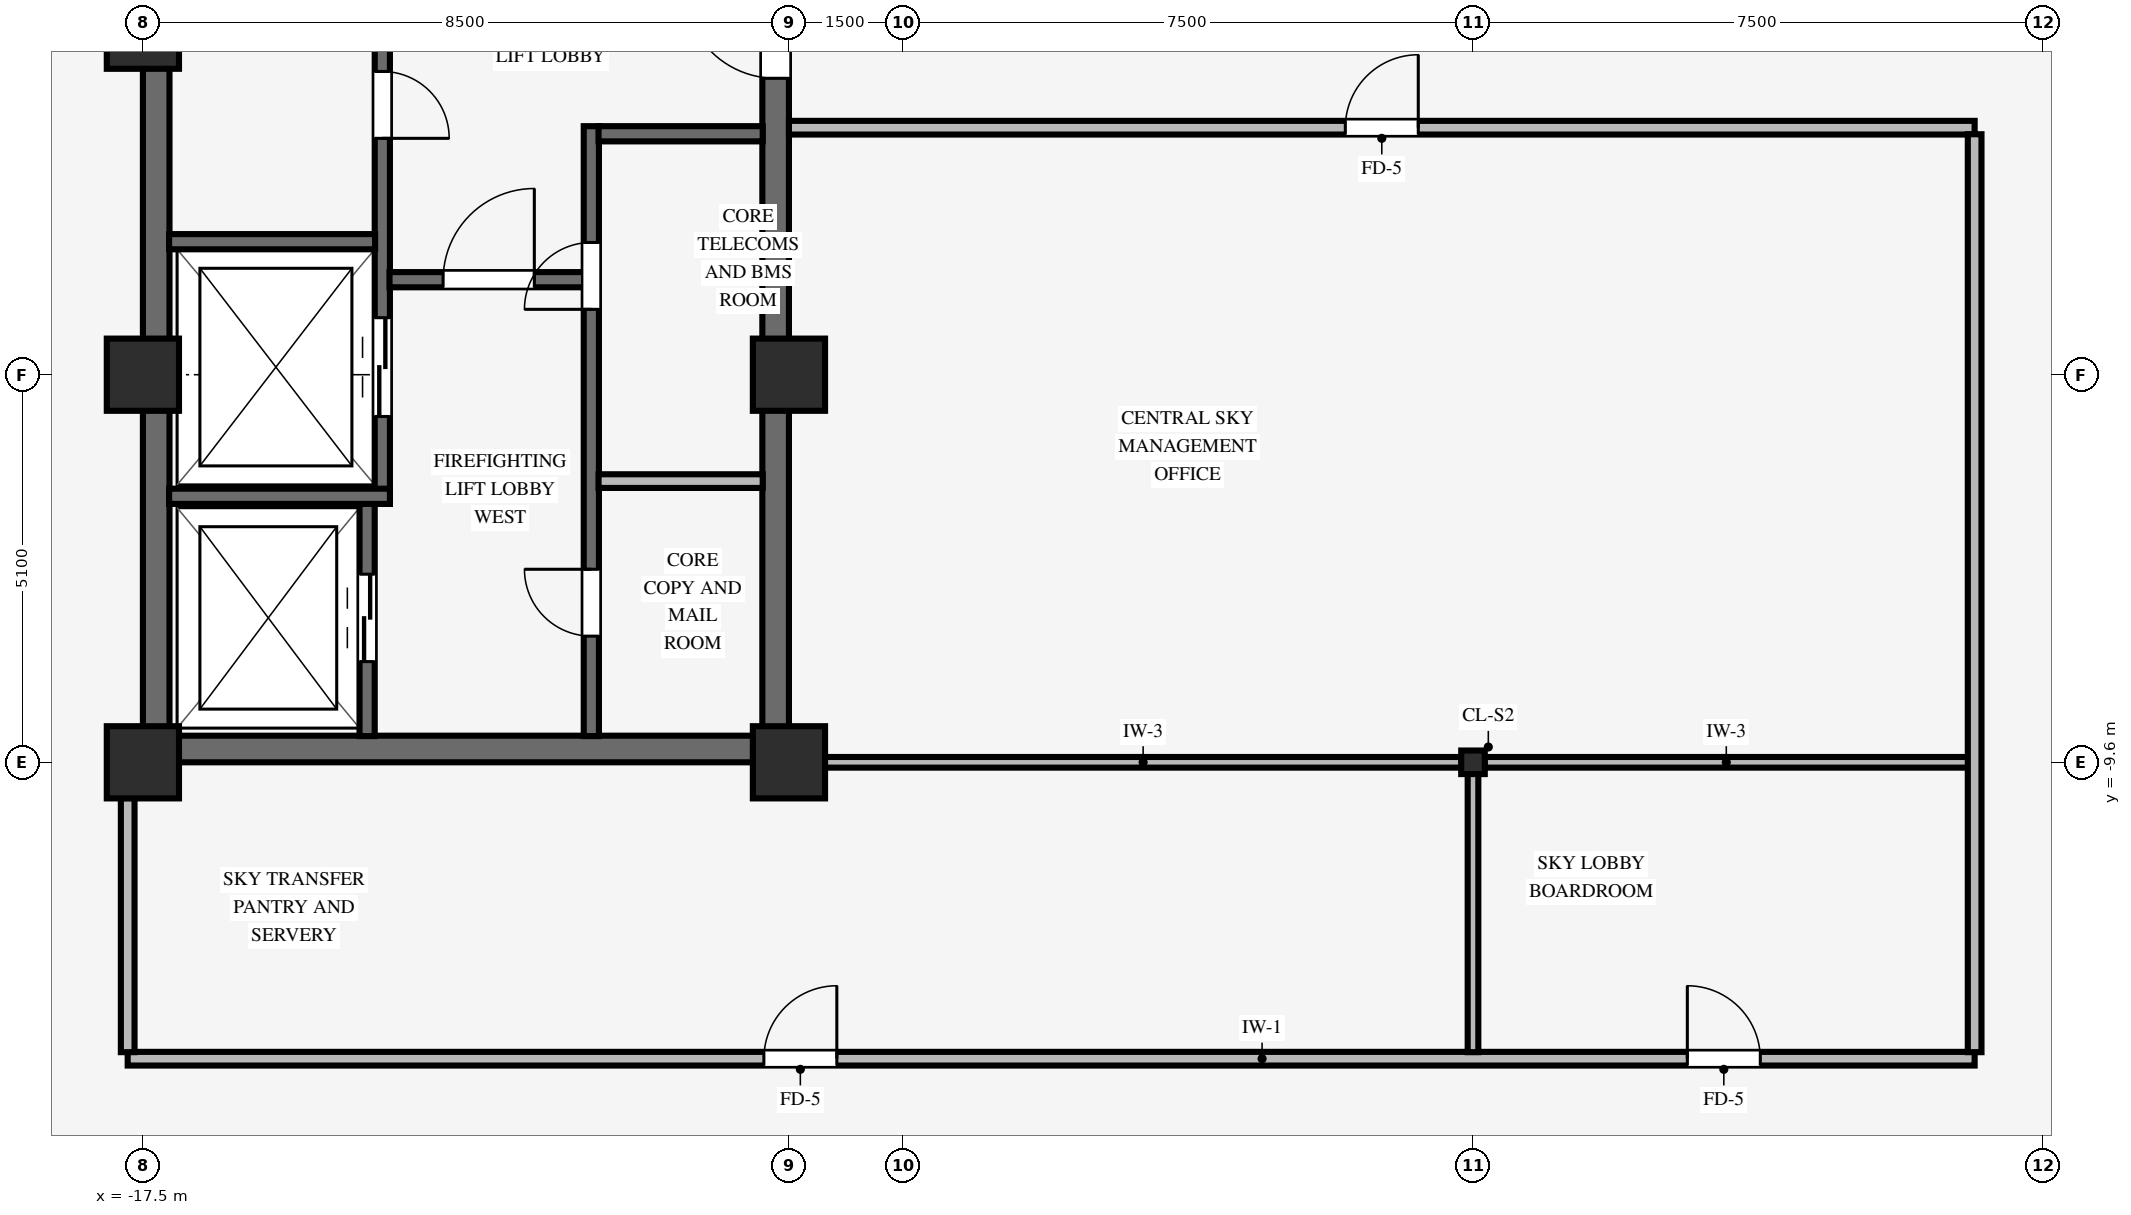
"""IFC4 building model, lengths in metres.
Left out: names, types, materials, properties, quantities, classifications, styles, units other than length and angle.
Written with IfcOpenShell. Run it as: python <this file> out.ifc"""

import sys

from ifc_helpers import new_model, si_unit, direction, frame, frame_2d, origin, origin_2d, place, context, subcontext, project, spatial, rectangle, i_section, extrude, source, transform, mapped, element, fill, save


model = new_model("IFC4")
c1 = context("Model", 3, precision=1e-05, world=origin(), true_north=direction((0.0, 1.0)))
c2 = subcontext(c1, "Body", "Model", "MODEL_VIEW")
j1 = project(units=[si_unit("LENGTHUNIT", "METRE"), si_unit("PLANEANGLEUNIT", "RADIAN")], contexts=[c1])
p1 = place(None, origin())
s1 = spatial("IfcSite", under=j1, at=p1, CompositionType="ELEMENT")
p2 = place(p1, origin())
s2 = spatial("IfcBuilding", under=s1, at=p2, CompositionType="ELEMENT")
p3 = place(p2, frame((0.0, 0.0, 223.75)))
s3 = spatial("IfcBuildingStorey", under=s2, at=p3, CompositionType="ELEMENT", Elevation=223.75)
p4 = place(p3, frame((-17.5, -9.425, 0.0), z_axis=(0.0, 0.0, 1.0), x_axis=(1.0, 0.0, 0.0)))
e1 = element("IfcWall", 1, at=p4, inside=s3, PredefinedType="SHEAR", context=c2, shape_type="SweptSolid", body=[
    extrude(rectangle(XDim=8.5, YDim=0.35, at=frame_2d((4.25, 0.0))), origin(), (0.0, 0.0, 1.0), 3.37),
])
p5 = place(p3, frame((-17.325, -9.255, 0.0), z_axis=(0.0, 0.0, 1.0), x_axis=(0.0, 1.0, 0.0)))
e2 = element("IfcWall", 2, at=p5, inside=s3, PredefinedType="SHEAR", context=c2, shape_type="SweptSolid", body=[
    extrude(rectangle(XDim=18.51, YDim=0.35, at=frame_2d((9.255, 0.0))), origin(), (0.0, 0.0, 1.0), 3.37),
])
p6 = place(p3, frame((-9.175, -9.255, 0.0), z_axis=(0.0, 0.0, 1.0), x_axis=(0.0, 1.0, 0.0)))
e3 = element("IfcWall", 3, at=p6, inside=s3, PredefinedType="SHEAR", context=c2, shape_type="SweptSolid", body=[
    extrude(rectangle(XDim=18.51, YDim=0.35, at=frame_2d((9.255, 0.0))), origin(), (0.0, 0.0, 1.0), 3.37),
])
p7 = place(p6, frame((8.655, 0.0, 0.0)))
e4 = element("IfcOpeningElement", 4, at=p7, cuts=e3, PredefinedType="OPENING", context=c2, shape_type="SweptSolid", body=[
    extrude(rectangle(XDim=1.2, YDim=2.15, at=frame_2d((0.6, 1.075))), frame((0.0, 0.185, 0.0), z_axis=(0.0, -1.0, 0.0), x_axis=(1.0, 0.0, 0.0)), (0.0, 0.0, 1.0), 0.37),
])
for number, where, z_axis, x_axis in (
    (5, (-17.5, -9.6, 0.0), (0.0, 0.0, 1.0), (1.0, 0.0, 0.0)),
    (6, (-17.5, -4.5, 0.0), (0.0, 0.0, 1.0), (1.0, 0.0, 0.0)),
    (7, (-9.0, -9.6, 0.0), (0.0, 0.0, 1.0), (1.0, 0.0, 0.0)),
    (8, (-9.0, -4.5, 0.0), (0.0, 0.0, 1.0), (1.0, 0.0, 0.0)),
    (9, (-17.5, 0.0, 0.0), (0.0, 0.0, 1.0), (1.0, 0.0, 0.0)),
):
    element("IfcColumn", number, at=place(p3, frame(where, z_axis=z_axis, x_axis=x_axis)), inside=s3, PredefinedType="COLUMN", context=c2, shape_type="SweptSolid", body=[
        extrude(rectangle(XDim=0.95, YDim=0.95, at=origin_2d()), origin(), (0.0, 0.0, 1.0), 3.37),
    ])
p8 = place(p3, frame((0.0, -9.6, 0.0), z_axis=(0.0, 0.0, 1.0), x_axis=(1.0, 0.0, 0.0)))
e10 = element("IfcColumn", 10, at=p8, inside=s3, PredefinedType="COLUMN", context=c2, shape_type="SweptSolid", body=[
    extrude(i_section(OverallWidth=0.31, OverallDepth=0.31, WebThickness=0.015, FlangeThickness=0.015, FilletRadius=0.015, at=origin_2d()), origin(), (0.0, 0.0, 1.0), 3.37),
])
p9 = place(p3, frame((-14.55, -9.255, 0.0), z_axis=(0.0, 0.0, 1.0), x_axis=(0.0, 1.0, 0.0)))
e11 = element("IfcWall", 11, at=p9, inside=s3, PredefinedType="SHEAR", context=c2, shape_type="SweptSolid", body=[
    extrude(rectangle(XDim=3.06, YDim=0.2, at=frame_2d((1.53, 0.0))), origin(), (0.0, 0.0, 1.0), 3.37),
])
p10 = place(p9, frame((0.98, 0.0, 0.0)))
e12 = element("IfcOpeningElement", 12, at=p10, cuts=e11, PredefinedType="OPENING", context=c2, shape_type="SweptSolid", body=[
    extrude(rectangle(XDim=1.15, YDim=2.15, at=frame_2d((0.575, 1.075))), frame((0.0, 0.11, 0.0), z_axis=(0.0, -1.0, 0.0), x_axis=(1.0, 0.0, 0.0)), (0.0, 0.0, 1.0), 0.22),
])
p11 = place(p3, frame((-14.35, -6.2, 0.0), z_axis=(0.0, 0.0, 1.0), x_axis=(0.0, 1.0, 0.0)))
e13 = element("IfcWall", 13, at=p11, inside=s3, PredefinedType="SHEAR", context=c2, shape_type="SweptSolid", body=[
    extrude(rectangle(XDim=7.105, YDim=0.2, at=frame_2d((3.552, 0.0))), origin(), (0.0, 0.0, 1.0), 3.37),
])
p12 = place(p11, frame((5.69, 0.0, 0.0), z_axis=(0.0, 0.0, 1.0), x_axis=(-1.0, 0.0, 0.0)))
e14 = element("IfcOpeningElement", 14, at=p12, cuts=e13, PredefinedType="OPENING", context=c2, shape_type="SweptSolid", body=[
    extrude(rectangle(XDim=0.88, YDim=2.1, at=frame_2d((0.44, 1.05))), frame((0.0, 0.11, 0.0), z_axis=(0.0, -1.0, 0.0), x_axis=(1.0, 0.0, 0.0)), (0.0, 0.0, 1.0), 0.22),
])
p13 = place(p11, frame((1.15, 0.0, 0.0)))
e15 = element("IfcOpeningElement", 15, at=p13, cuts=e13, PredefinedType="OPENING", context=c2, shape_type="SweptSolid", body=[
    extrude(rectangle(XDim=1.3, YDim=2.2, at=frame_2d((0.65, 1.1))), frame((0.0, 0.11, 0.0), z_axis=(0.0, -1.0, 0.0), x_axis=(1.0, 0.0, 0.0)), (0.0, 0.0, 1.0), 0.22),
])
p14 = place(p3, frame((-17.155, -6.1, 0.0), z_axis=(0.0, 0.0, 1.0), x_axis=(1.0, 0.0, 0.0)))
e16 = element("IfcWall", 16, at=p14, inside=s3, PredefinedType="SHEAR", context=c2, shape_type="SweptSolid", body=[
    extrude(rectangle(XDim=2.905, YDim=0.2, at=frame_2d((1.453, 0.0))), origin(), (0.0, 0.0, 1.0), 3.37),
])
p15 = place(p3, frame((-17.155, -2.75, 0.0), z_axis=(0.0, 0.0, 1.0), x_axis=(1.0, 0.0, 0.0)))
e17 = element("IfcWall", 17, at=p15, inside=s3, PredefinedType="SHEAR", context=c2, shape_type="SweptSolid", body=[
    extrude(rectangle(XDim=2.71, YDim=0.2, at=frame_2d((1.355, 0.0))), origin(), (0.0, 0.0, 1.0), 3.37),
])
p16 = place(p3, frame((-11.6, -9.255, 0.0), z_axis=(0.0, 0.0, 1.0), x_axis=(0.0, 1.0, 0.0)))
e18 = element("IfcWall", 18, at=p16, inside=s3, PredefinedType="SHEAR", context=c2, shape_type="SweptSolid", body=[
    extrude(rectangle(XDim=8.025, YDim=0.2, at=frame_2d((4.012, 0.0))), origin(), (0.0, 0.0, 1.0), 3.37),
])
p17 = place(p16, frame((1.315, 0.0, 0.0)))
e19 = element("IfcOpeningElement", 19, at=p17, cuts=e18, PredefinedType="OPENING", context=c2, shape_type="SweptSolid", body=[
    extrude(rectangle(XDim=0.88, YDim=2.1, at=frame_2d((0.44, 1.05))), frame((0.0, 0.11, 0.0), z_axis=(0.0, -1.0, 0.0), x_axis=(1.0, 0.0, 0.0)), (0.0, 0.0, 1.0), 0.22),
])
p18 = place(p16, frame((5.615, 0.0, 0.0)))
e20 = element("IfcOpeningElement", 20, at=p18, cuts=e18, PredefinedType="OPENING", context=c2, shape_type="SweptSolid", body=[
    extrude(rectangle(XDim=0.88, YDim=2.1, at=frame_2d((0.44, 1.05))), frame((0.0, 0.11, 0.0), z_axis=(0.0, -1.0, 0.0), x_axis=(1.0, 0.0, 0.0)), (0.0, 0.0, 1.0), 0.22),
])
p19 = place(p3, frame((-14.255, -3.25, 0.0), z_axis=(0.0, 0.0, 1.0), x_axis=(1.0, 0.0, 0.0)))
e21 = element("IfcWall", 21, at=p19, inside=s3, PredefinedType="SHEAR", context=c2, shape_type="SweptSolid", body=[
    extrude(rectangle(XDim=2.56, YDim=0.2, at=frame_2d((1.28, 0.0))), origin(), (0.0, 0.0, 1.0), 3.37),
])
p20 = place(p19, frame((0.705, 0.0, 0.0)))
e22 = element("IfcOpeningElement", 22, at=p20, cuts=e21, PredefinedType="OPENING", context=c2, shape_type="SweptSolid", body=[
    extrude(rectangle(XDim=1.2, YDim=2.15, at=frame_2d((0.6, 1.075))), frame((0.0, 0.11, 0.0), z_axis=(0.0, -1.0, 0.0), x_axis=(1.0, 0.0, 0.0)), (0.0, 0.0, 1.0), 0.22),
])
p21 = place(p3, frame((-11.505, -1.33, 0.0), z_axis=(0.0, 0.0, 1.0), x_axis=(1.0, 0.0, 0.0)))
e23 = element("IfcWall", 23, at=p21, inside=s3, PredefinedType="SHEAR", context=c2, shape_type="SweptSolid", body=[
    extrude(rectangle(XDim=2.16, YDim=0.2, at=frame_2d((1.08, 0.0))), origin(), (0.0, 0.0, 1.0), 3.37),
])
p22 = place(p3, frame((-11.505, -5.9, 0.0), z_axis=(0.0, 0.0, 1.0), x_axis=(1.0, 0.0, 0.0)))
e24 = element("IfcWall", 24, at=p22, inside=s3, PredefinedType="PARTITIONING", context=c2, shape_type="SweptSolid", body=[
    extrude(rectangle(XDim=2.16, YDim=0.18, at=frame_2d((1.08, 0.0))), origin(), (0.0, 0.0, 1.0), 3.36),
])
p23 = place(p3, frame((-17.7, -13.5, 0.0), z_axis=(0.0, 0.0, 1.0), x_axis=(1.0, 0.0, 0.0)))
e25 = element("IfcWall", 25, at=p23, inside=s3, PredefinedType="PARTITIONING", context=c2, shape_type="SweptSolid", body=[
    extrude(rectangle(XDim=24.3, YDim=0.18, at=frame_2d((12.15, 0.0))), origin(), (0.0, 0.0, 1.0), 3.049),
])
p24 = place(p23, frame((8.37, 0.0, 0.0)))
e26 = element("IfcOpeningElement", 26, at=p24, cuts=e25, PredefinedType="OPENING", context=c2, shape_type="SweptSolid", body=[
    extrude(rectangle(XDim=0.96, YDim=2.1, at=frame_2d((0.48, 1.05))), frame((0.0, 0.1, 0.0), z_axis=(0.0, -1.0, 0.0), x_axis=(1.0, 0.0, 0.0)), (0.0, 0.0, 1.0), 0.2),
])
p25 = place(p23, frame((20.52, 0.0, 0.0)))
e27 = element("IfcOpeningElement", 27, at=p25, cuts=e25, PredefinedType="OPENING", context=c2, shape_type="SweptSolid", body=[
    extrude(rectangle(XDim=0.96, YDim=2.1, at=frame_2d((0.48, 1.05))), frame((0.0, 0.1, 0.0), z_axis=(0.0, -1.0, 0.0), x_axis=(1.0, 0.0, 0.0)), (0.0, 0.0, 1.0), 0.2),
])
p26 = place(p3, frame((-8.529, -9.6, 0.0), z_axis=(0.0, 0.0, 1.0), x_axis=(1.0, 0.0, 0.0)))
e28 = element("IfcWall", 28, at=p26, inside=s3, PredefinedType="PARTITIONING", context=c2, shape_type="SweptSolid", body=[
    extrude(rectangle(XDim=8.378, YDim=0.14, at=frame_2d((4.189, 0.0))), origin(), (0.0, 0.0, 1.0), 2.405),
])
p27 = place(p3, frame((0.151, -9.6, 0.0), z_axis=(0.0, 0.0, 1.0), x_axis=(1.0, 0.0, 0.0)))
e29 = element("IfcWall", 29, at=p27, inside=s3, PredefinedType="PARTITIONING", context=c2, shape_type="SweptSolid", body=[
    extrude(rectangle(XDim=6.363, YDim=0.14, at=frame_2d((3.182, 0.0))), origin(), (0.0, 0.0, 1.0), 2.405),
])
p28 = place(p3, frame((-9.0, -1.25, 0.0), z_axis=(0.0, 0.0, 1.0), x_axis=(1.0, 0.0, 0.0)))
e30 = element("IfcWall", 30, at=p28, inside=s3, PredefinedType="PARTITIONING", context=c2, shape_type="SweptSolid", body=[
    extrude(rectangle(XDim=15.6, YDim=0.18, at=frame_2d((7.8, 0.0))), origin(), (0.0, 0.0, 1.0), 3.36),
])
p29 = place(p28, frame((7.32, 0.0, 0.0)))
e31 = element("IfcOpeningElement", 31, at=p29, cuts=e30, PredefinedType="OPENING", context=c2, shape_type="SweptSolid", body=[
    extrude(rectangle(XDim=0.96, YDim=2.1, at=frame_2d((0.48, 1.05))), frame((0.0, 0.1, 0.0), z_axis=(0.0, -1.0, 0.0), x_axis=(1.0, 0.0, 0.0)), (0.0, 0.0, 1.0), 0.2),
])
p30 = place(p3, frame((-17.7, -13.414, 0.0), z_axis=(0.0, 0.0, 1.0), x_axis=(0.0, 1.0, 0.0)))
e32 = element("IfcWall", 32, at=p30, inside=s3, PredefinedType="PARTITIONING", context=c2, shape_type="SweptSolid", body=[
    extrude(rectangle(XDim=3.343, YDim=0.18, at=frame_2d((1.671, 0.0))), origin(), (0.0, 0.0, 1.0), 2.892),
])
p31 = place(p3, frame((0.0, -13.414, 0.0), z_axis=(0.0, 0.0, 1.0), x_axis=(0.0, 1.0, 0.0)))
e33 = element("IfcWall", 33, at=p31, inside=s3, PredefinedType="PARTITIONING", context=c2, shape_type="SweptSolid", body=[
    extrude(rectangle(XDim=3.663, YDim=0.14, at=frame_2d((1.832, 0.0))), origin(), (0.0, 0.0, 1.0), 2.892),
])
p32 = place(p3, frame((6.6, -13.414, 0.0), z_axis=(0.0, 0.0, 1.0), x_axis=(0.0, 1.0, 0.0)))
e34 = element("IfcWall", 34, at=p32, inside=s3, PredefinedType="PARTITIONING", context=c2, shape_type="SweptSolid", body=[
    extrude(rectangle(XDim=12.078, YDim=0.18, at=frame_2d((6.039, 0.0))), origin(), (0.0, 0.0, 1.0), 3.36),
])
m1 = source(origin(), c2, "Body", "SweptSolid", [
    extrude(rectangle(XDim=0.88, YDim=2.1, at=frame_2d((0.44, 1.05))), frame((0.0, 0.025, 0.0), z_axis=(0.0, -1.0, 0.0), x_axis=(1.0, 0.0, 0.0)), (0.0, 0.0, 1.0), 0.05),
])
p33 = place(p12, origin())
e35 = element("IfcDoor", 35, at=p33, inside=s3, OperationType="SINGLE_SWING_RIGHT", PredefinedType="DOOR", context=c2, shape_type="MappedRepresentation", body=[
    mapped(m1, transform((0.0, 0.0, 0.0), scale=1.0)),
])
fill(e14, e35)
m2 = source(origin(), c2, "Body", "SweptSolid", [
    extrude(rectangle(XDim=1.2, YDim=2.15, at=frame_2d((0.6, 1.075))), frame((0.0, 0.025, 0.0), z_axis=(0.0, -1.0, 0.0), x_axis=(1.0, 0.0, 0.0)), (0.0, 0.0, 1.0), 0.05),
])
p34 = place(p20, origin())
e36 = element("IfcDoor", 36, at=p34, inside=s3, OperationType="SINGLE_SWING_RIGHT", PredefinedType="DOOR", context=c2, shape_type="MappedRepresentation", body=[
    mapped(m2, transform((0.0, 0.0, 0.0), scale=1.0)),
])
fill(e22, e36)
p35 = place(p17, origin())
e37 = element("IfcDoor", 37, at=p35, inside=s3, OperationType="SINGLE_SWING_RIGHT", PredefinedType="DOOR", context=c2, shape_type="MappedRepresentation", body=[
    mapped(m1, transform((0.0, 0.0, 0.0), scale=1.0)),
])
fill(e19, e37)
p36 = place(p18, origin())
e38 = element("IfcDoor", 38, at=p36, inside=s3, OperationType="SINGLE_SWING_LEFT", PredefinedType="DOOR", context=c2, shape_type="MappedRepresentation", body=[
    mapped(m1, transform((0.0, 0.0, 0.0), scale=1.0)),
])
fill(e20, e38)
p37 = place(p7, origin())
e39 = element("IfcDoor", 39, at=p37, inside=s3, OperationType="SINGLE_SWING_RIGHT", PredefinedType="DOOR", context=c2, shape_type="MappedRepresentation", body=[
    mapped(m2, transform((0.0, 0.0, 0.0), scale=1.0)),
])
fill(e4, e39)
m3 = source(origin(), c2, "Body", "SweptSolid", [
    extrude(rectangle(XDim=1.15, YDim=2.15, at=frame_2d((0.575, 1.075))), frame((0.0, 0.025, 0.0), z_axis=(0.0, -1.0, 0.0), x_axis=(1.0, 0.0, 0.0)), (0.0, 0.0, 1.0), 0.05),
])
p38 = place(p10, origin())
e40 = element("IfcDoor", 40, at=p38, inside=s3, OperationType="DOUBLE_DOOR_SLIDING", PredefinedType="DOOR", context=c2, shape_type="MappedRepresentation", body=[
    mapped(m3, transform((0.0, 0.0, 0.0), scale=1.0)),
])
fill(e12, e40)
m4 = source(origin(), c2, "Body", "SweptSolid", [
    extrude(rectangle(XDim=1.3, YDim=2.2, at=frame_2d((0.65, 1.1))), frame((0.0, 0.025, 0.0), z_axis=(0.0, -1.0, 0.0), x_axis=(1.0, 0.0, 0.0)), (0.0, 0.0, 1.0), 0.05),
])
p39 = place(p13, origin())
e41 = element("IfcDoor", 41, at=p39, inside=s3, OperationType="DOUBLE_DOOR_SLIDING", PredefinedType="DOOR", context=c2, shape_type="MappedRepresentation", body=[
    mapped(m4, transform((0.0, 0.0, 0.0), scale=1.0)),
])
fill(e15, e41)
m5 = source(origin(), c2, "Body", "SweptSolid", [
    extrude(rectangle(XDim=0.96, YDim=2.1, at=frame_2d((0.48, 1.05))), frame((0.0, 0.025, 0.0), z_axis=(0.0, -1.0, 0.0), x_axis=(1.0, 0.0, 0.0)), (0.0, 0.0, 1.0), 0.05),
])
p40 = place(p24, origin())
e42 = element("IfcDoor", 42, at=p40, inside=s3, OperationType="SINGLE_SWING_RIGHT", PredefinedType="DOOR", context=c2, shape_type="MappedRepresentation", body=[
    mapped(m5, transform((0.0, 0.0, 0.0), scale=1.0)),
])
fill(e26, e42)
p41 = place(p29, origin())
e43 = element("IfcDoor", 43, at=p41, inside=s3, OperationType="SINGLE_SWING_RIGHT", PredefinedType="DOOR", context=c2, shape_type="MappedRepresentation", body=[
    mapped(m5, transform((0.0, 0.0, 0.0), scale=1.0)),
])
fill(e31, e43)
p42 = place(p25, origin())
e44 = element("IfcDoor", 44, at=p42, inside=s3, OperationType="SINGLE_SWING_LEFT", PredefinedType="DOOR", context=c2, shape_type="MappedRepresentation", body=[
    mapped(m5, transform((0.0, 0.0, 0.0), scale=1.0)),
])
fill(e27, e44)
save(model, sys.argv[1])
